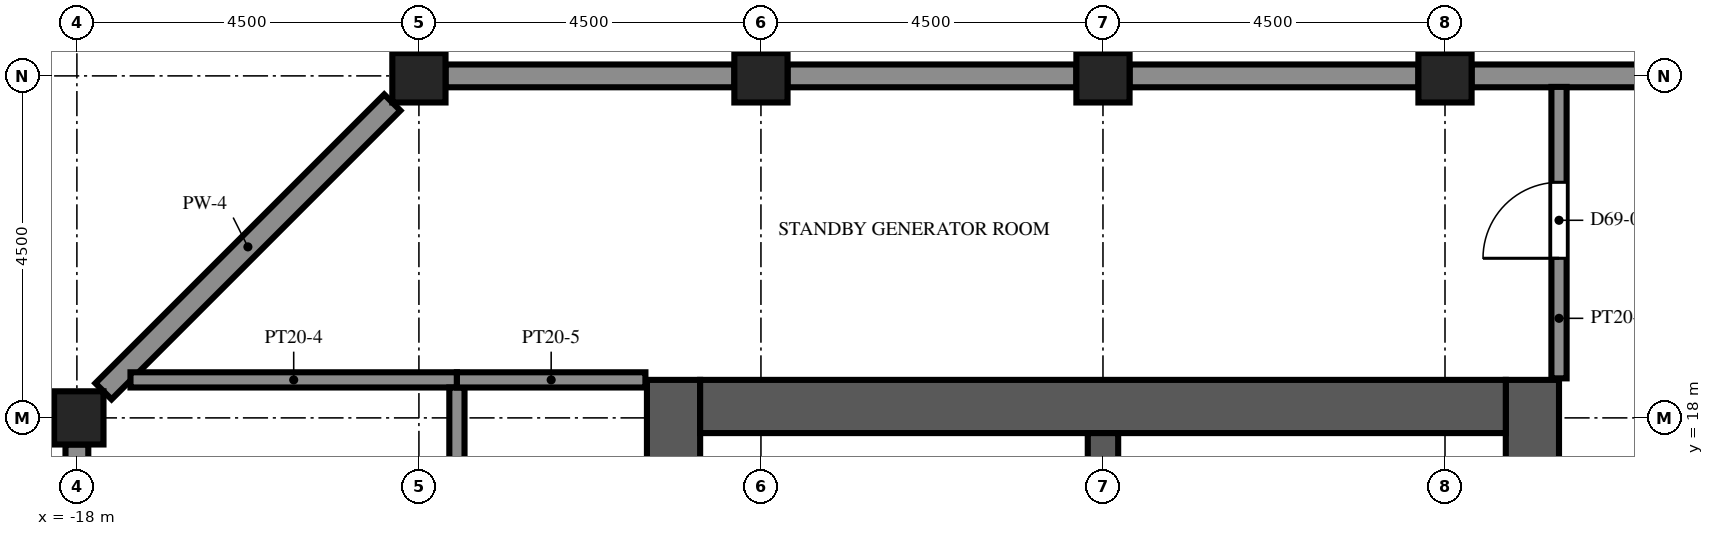
"""IFC4 building model, lengths in metres.
Left out: names, types, materials, properties, quantities, classifications, styles, units other than length and angle.
Written with IfcOpenShell. Run it as: python <this file> out.ifc"""

import sys

from ifc_helpers import new_model, si_unit, direction, frame, frame_2d, origin, origin_2d, place, context, subcontext, project, spatial, rectangle, extrude, element, fill, save


model = new_model("IFC4")
c1 = context("Model", 3, precision=1e-05, world=origin(), true_north=direction((0.0, 1.0)))
c2 = subcontext(c1, "Body", "Model", "MODEL_VIEW")
j1 = project(units=[si_unit("LENGTHUNIT", "METRE"), si_unit("PLANEANGLEUNIT", "RADIAN")], contexts=[c1])
p1 = place(None, origin())
s1 = spatial("IfcSite", under=j1, at=p1, CompositionType="ELEMENT")
p2 = place(p1, origin())
s2 = spatial("IfcBuilding", under=s1, at=p2, CompositionType="ELEMENT")
p3 = place(p2, frame((0.0, 0.0, 306.4)))
s3 = spatial("IfcBuildingStorey", under=s2, at=p3, CompositionType="ELEMENT", Elevation=306.4)
for number, where, z_axis, x_axis in (
    (1, (-18.0, 18.0, 0.0), (0.0, 0.0, 1.0), (1.0, 0.0, 0.0)),
    (2, (-13.5, 22.5, 0.0), (0.0, 0.0, 1.0), (1.0, 0.0, 0.0)),
    (3, (-9.0, 22.5, 0.0), (0.0, 0.0, 1.0), (1.0, 0.0, 0.0)),
    (4, (-4.5, 22.5, 0.0), (0.0, 0.0, 1.0), (1.0, 0.0, 0.0)),
    (5, (0.0, 22.5, 0.0), (0.0, 0.0, 1.0), (1.0, 0.0, 0.0)),
):
    element("IfcColumn", number, at=place(p3, frame(where, z_axis=z_axis, x_axis=x_axis)), inside=s3, PredefinedType="COLUMN", context=c2, shape_type="SweptSolid", body=[
        extrude(rectangle(XDim=0.7, YDim=0.7, at=origin_2d()), origin(), (0.0, 0.0, 1.0), 5.4),
    ])
p4 = place(p3, frame((-10.15, -9.0, 0.0), z_axis=(0.0, 0.0, 1.0), x_axis=(0.0, 1.0, 0.0)))
e6 = element("IfcWall", 6, at=p4, inside=s3, PredefinedType="SHEAR", context=c2, shape_type="SweptSolid", body=[
    extrude(rectangle(XDim=27.5, YDim=0.7, at=frame_2d((13.75, 0.0))), origin(), (0.0, 0.0, 1.0), 5.4),
])
p5 = place(p4, frame((12.55, 0.0, 0.0)))
e7 = element("IfcOpeningElement", 7, at=p5, cuts=e6, PredefinedType="OPENING", context=c2, shape_type="SweptSolid", body=[
    extrude(rectangle(XDim=2.4, YDim=2.4, at=frame_2d((1.2, 1.2))), frame((0.0, 0.36, 0.0), z_axis=(0.0, -1.0, 0.0), x_axis=(1.0, 0.0, 0.0)), (0.0, 0.0, 1.0), 0.72),
])
p6 = place(p4, frame((6.825, 0.0, 0.0)))
e8 = element("IfcOpeningElement", 8, at=p6, cuts=e6, PredefinedType="OPENING", context=c2, shape_type="SweptSolid", body=[
    extrude(rectangle(XDim=1.2, YDim=2.1, at=frame_2d((0.6, 1.05))), frame((0.0, 0.36, 0.0), z_axis=(0.0, -1.0, 0.0), x_axis=(1.0, 0.0, 0.0)), (0.0, 0.0, 1.0), 0.72),
])
p7 = place(p4, frame((19.475, 0.0, 0.0)))
e9 = element("IfcOpeningElement", 9, at=p7, cuts=e6, PredefinedType="OPENING", context=c2, shape_type="SweptSolid", body=[
    extrude(rectangle(XDim=1.2, YDim=2.1, at=frame_2d((0.6, 1.05))), frame((0.0, 0.36, 0.0), z_axis=(0.0, -1.0, 0.0), x_axis=(1.0, 0.0, 0.0)), (0.0, 0.0, 1.0), 0.72),
])
p8 = place(p3, frame((1.15, -9.0, 0.0), z_axis=(0.0, 0.0, 1.0), x_axis=(0.0, 1.0, 0.0)))
e10 = element("IfcWall", 10, at=p8, inside=s3, PredefinedType="SHEAR", context=c2, shape_type="SweptSolid", body=[
    extrude(rectangle(XDim=27.5, YDim=0.7, at=frame_2d((13.75, 0.0))), origin(), (0.0, 0.0, 1.0), 5.4),
])
p9 = place(p8, frame((12.55, 0.0, 0.0)))
e11 = element("IfcOpeningElement", 11, at=p9, cuts=e10, PredefinedType="OPENING", context=c2, shape_type="SweptSolid", body=[
    extrude(rectangle(XDim=2.4, YDim=2.4, at=frame_2d((1.2, 1.2))), frame((0.0, 0.36, 0.0), z_axis=(0.0, -1.0, 0.0), x_axis=(1.0, 0.0, 0.0)), (0.0, 0.0, 1.0), 0.72),
])
p10 = place(p8, frame((5.46, 0.0, 0.0)))
e12 = element("IfcOpeningElement", 12, at=p10, cuts=e10, PredefinedType="OPENING", context=c2, shape_type="SweptSolid", body=[
    extrude(rectangle(XDim=0.968, YDim=2.1, at=frame_2d((0.484, 1.05))), frame((0.0, 0.36, 0.0), z_axis=(0.0, -1.0, 0.0), x_axis=(1.0, 0.0, 0.0)), (0.0, 0.0, 1.0), 0.72),
])
p11 = place(p8, frame((23.54, 0.0, 0.0)))
e13 = element("IfcOpeningElement", 13, at=p11, cuts=e10, PredefinedType="OPENING", context=c2, shape_type="SweptSolid", body=[
    extrude(rectangle(XDim=1.2, YDim=2.1, at=frame_2d((0.6, 1.05))), frame((0.0, 0.36, 0.0), z_axis=(0.0, -1.0, 0.0), x_axis=(1.0, 0.0, 0.0)), (0.0, 0.0, 1.0), 0.72),
])
p12 = place(p3, frame((-9.8, 18.15, 0.0), z_axis=(0.0, 0.0, 1.0), x_axis=(1.0, 0.0, 0.0)))
e14 = element("IfcWall", 14, at=p12, inside=s3, PredefinedType="SHEAR", context=c2, shape_type="SweptSolid", body=[
    extrude(rectangle(XDim=10.6, YDim=0.7, at=frame_2d((5.3, 0.0))), origin(), (0.0, 0.0, 1.0), 5.4),
])
p13 = place(p3, frame((-4.5, 10.2, 0.0), z_axis=(0.0, 0.0, 1.0), x_axis=(0.0, 1.0, 0.0)))
e15 = element("IfcWall", 15, at=p13, inside=s3, PredefinedType="SHEAR", context=c2, shape_type="SweptSolid", body=[
    extrude(rectangle(XDim=7.6, YDim=0.4, at=frame_2d((3.8, 0.0))), origin(), (0.0, 0.0, 1.0), 5.4),
])
for number, where, z_axis, x_axis in (
    (16, (4.15, 22.5, 0.0), (0.0, 0.0, 1.0), (-1.0, 0.0, 0.0)),
    (17, (-0.35, 22.5, 0.0), (0.0, 0.0, 1.0), (-1.0, 0.0, 0.0)),
    (18, (-4.85, 22.5, 0.0), (0.0, 0.0, 1.0), (-1.0, 0.0, 0.0)),
    (19, (-9.35, 22.5, 0.0), (0.0, 0.0, 1.0), (-1.0, 0.0, 0.0)),
):
    element("IfcWall", number, at=place(p3, frame(where, z_axis=z_axis, x_axis=x_axis)), inside=s3, PredefinedType="SOLIDWALL", context=c2, shape_type="SweptSolid", body=[
        extrude(rectangle(XDim=3.8, YDim=0.3, at=frame_2d((1.9, 0.0))), origin(), (0.0, 0.0, 1.0), 0.85),
    ])
p14 = place(p3, frame((-13.85, 22.15, 0.0), z_axis=(0.0, 0.0, 1.0), x_axis=(-0.707106781187, -0.707106781187, 0.0)))
e20 = element("IfcWall", 20, at=p14, inside=s3, PredefinedType="SOLIDWALL", context=c2, shape_type="SweptSolid", body=[
    extrude(rectangle(XDim=5.374, YDim=0.3, at=frame_2d((2.687, 0.0))), origin(), (0.0, 0.0, 1.0), 4.1),
])
p15 = place(p3, frame((-18.0, 17.65, 0.0), z_axis=(0.0, 0.0, 1.0), x_axis=(0.0, -1.0, 0.0)))
e21 = element("IfcWall", 21, at=p15, inside=s3, PredefinedType="SOLIDWALL", context=c2, shape_type="SweptSolid", body=[
    extrude(rectangle(XDim=3.8, YDim=0.3, at=frame_2d((1.9, 0.0))), origin(), (0.0, 0.0, 1.0), 0.85),
])
p16 = place(p3, frame((-17.295, 18.5, 0.0), z_axis=(0.0, 0.0, 1.0), x_axis=(1.0, 0.0, 0.0)))
e22 = element("IfcWall", 22, at=p16, inside=s3, PredefinedType="PARTITIONING", context=c2, shape_type="SweptSolid", body=[
    extrude(rectangle(XDim=4.295, YDim=0.2, at=frame_2d((2.147, 0.0))), origin(), (0.0, 0.0, 1.0), 3.6),
])
p17 = place(p3, frame((-13.0, 3.0, 0.0), z_axis=(0.0, 0.0, 1.0), x_axis=(0.0, 1.0, 0.0)))
e23 = element("IfcWall", 23, at=p17, inside=s3, PredefinedType="PARTITIONING", context=c2, shape_type="SweptSolid", body=[
    extrude(rectangle(XDim=15.4, YDim=0.2, at=frame_2d((7.7, 0.0))), origin(), (0.0, 0.0, 1.0), 3.6),
])
p18 = place(p17, frame((7.35, 0.0, 0.0)))
e24 = element("IfcOpeningElement", 24, at=p18, cuts=e23, PredefinedType="OPENING", context=c2, shape_type="SweptSolid", body=[
    extrude(rectangle(XDim=1.0, YDim=2.1, at=frame_2d((0.5, 1.05))), frame((0.0, 0.11, 0.0), z_axis=(0.0, -1.0, 0.0), x_axis=(1.0, 0.0, 0.0)), (0.0, 0.0, 1.0), 0.22),
])
p19 = place(p3, frame((-13.0, 18.5, 0.0), z_axis=(0.0, 0.0, 1.0), x_axis=(1.0, 0.0, 0.0)))
e25 = element("IfcWall", 25, at=p19, inside=s3, PredefinedType="PARTITIONING", context=c2, shape_type="SweptSolid", body=[
    extrude(rectangle(XDim=2.48, YDim=0.2, at=frame_2d((1.24, 0.0))), origin(), (0.0, 0.0, 1.0), 4.8),
])
p20 = place(p3, frame((1.5, 18.52, 0.0), z_axis=(0.0, 0.0, 1.0), x_axis=(0.0, 1.0, 0.0)))
e26 = element("IfcWall", 26, at=p20, inside=s3, PredefinedType="PARTITIONING", context=c2, shape_type="SweptSolid", body=[
    extrude(rectangle(XDim=3.835, YDim=0.2, at=frame_2d((1.917, 0.0))), origin(), (0.0, 0.0, 1.0), 4.8),
])
p21 = place(p20, frame((1.58, 0.0, 0.0)))
e27 = element("IfcOpeningElement", 27, at=p21, cuts=e26, PredefinedType="OPENING", context=c2, shape_type="SweptSolid", body=[
    extrude(rectangle(XDim=1.0, YDim=2.1, at=frame_2d((0.5, 1.05))), frame((0.0, 0.11, 0.0), z_axis=(0.0, -1.0, 0.0), x_axis=(1.0, 0.0, 0.0)), (0.0, 0.0, 1.0), 0.22),
])
p22 = place(p3, frame((-0.5, 15.14, 0.0), z_axis=(0.0, 0.0, 1.0), x_axis=(0.0, 1.0, 0.0)))
e28 = element("IfcWall", 28, at=p22, inside=s3, PredefinedType="PARTITIONING", context=c2, shape_type="SweptSolid", body=[
    extrude(rectangle(XDim=2.66, YDim=0.1, at=frame_2d((1.33, 0.0))), origin(), (0.0, 0.0, 1.0), 4.8),
])
p23 = place(p22, frame((0.83, 0.0, 0.0)))
e29 = element("IfcOpeningElement", 29, at=p23, cuts=e28, PredefinedType="OPENING", context=c2, shape_type="SweptSolid", body=[
    extrude(rectangle(XDim=1.0, YDim=2.1, at=frame_2d((0.5, 1.05))), frame((0.0, 0.06, 0.0), z_axis=(0.0, -1.0, 0.0), x_axis=(1.0, 0.0, 0.0)), (0.0, 0.0, 1.0), 0.12),
])
p24 = place(p21, origin())
e30 = element("IfcDoor", 30, at=p24, inside=s3, OperationType="SINGLE_SWING_LEFT", PredefinedType="DOOR", context=c2, shape_type="SweptSolid", body=[
    extrude(rectangle(XDim=1.0, YDim=2.1, at=frame_2d((0.5, 1.05))), frame((0.0, 0.025, 0.0), z_axis=(0.0, -1.0, 0.0), x_axis=(1.0, 0.0, 0.0)), (0.0, 0.0, 1.0), 0.05),
])
fill(e27, e30)
save(model, sys.argv[1])
